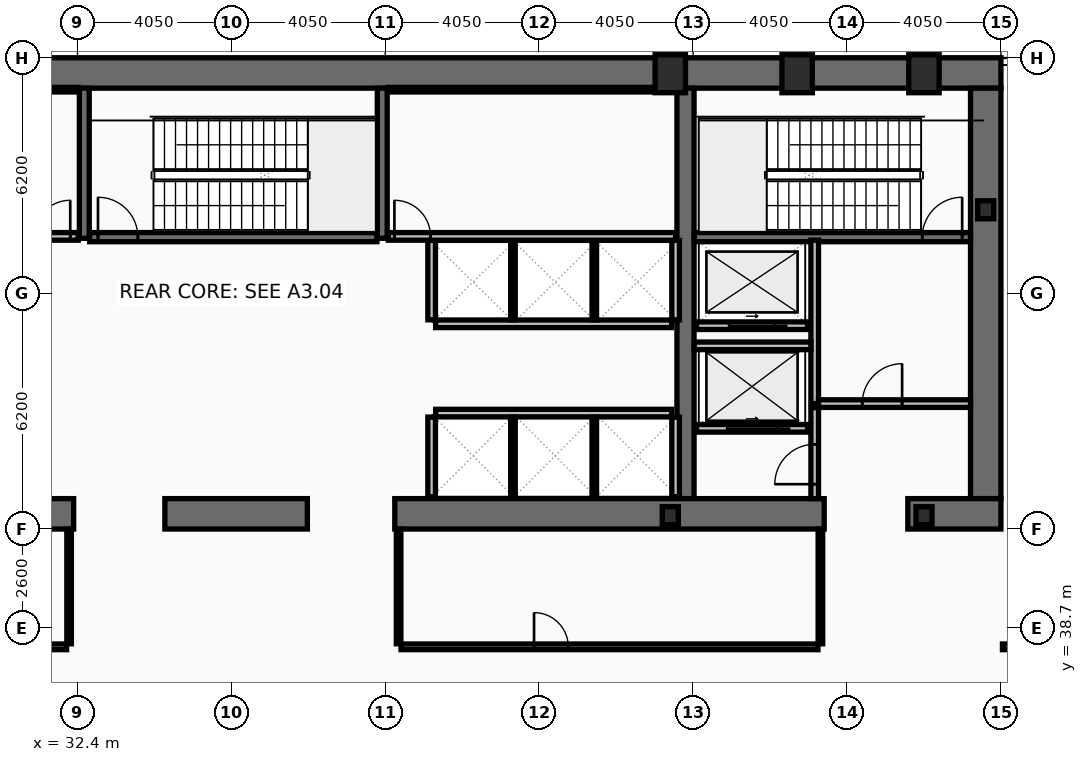
"""IFC4 building model, lengths in metres.
Left out: names, types, materials, properties, quantities, classifications, styles, units other than length and angle.
Written with IfcOpenShell. Run it as: python <this file> out.ifc"""

import sys

from ifc_helpers import new_model, si_unit, direction, frame, frame_2d, origin, origin_2d, place, context, subcontext, project, spatial, rectangle, hollow_rectangle, i_section, extrude, element, fill, save


model = new_model("IFC4")
c1 = context("Model", 3, precision=1e-05, world=origin(), true_north=direction((0.0, 1.0)))
c2 = subcontext(c1, "Body", "Model", "MODEL_VIEW")
j1 = project(units=[si_unit("LENGTHUNIT", "METRE"), si_unit("PLANEANGLEUNIT", "RADIAN")], contexts=[c1])
p1 = place(None, origin())
s1 = spatial("IfcSite", under=j1, at=p1, CompositionType="ELEMENT")
p2 = place(p1, origin())
s2 = spatial("IfcBuilding", under=s1, at=p2, CompositionType="ELEMENT")
p3 = place(p2, frame((0.0, 0.0, 15.4)))
s3 = spatial("IfcBuildingStorey", under=s2, at=p3, CompositionType="ELEMENT", Elevation=15.4)
p4 = place(p3, frame((16.2, 53.3, 0.0), z_axis=(0.0, 0.0, 1.0), x_axis=(1.0, 0.0, 0.0)))
e1 = element("IfcWall", 1, at=p4, inside=s3, PredefinedType="SHEAR", context=c2, shape_type="SweptSolid", body=[
    extrude(rectangle(XDim=40.5, YDim=0.8, at=frame_2d((20.25, 0.0))), origin(), (0.0, 0.0, 1.0), 4.78),
])
p5 = place(p3, frame((56.3, 52.9, 0.0), z_axis=(0.0, 0.0, 1.0), x_axis=(0.0, -1.0, 0.0)))
e2 = element("IfcWall", 2, at=p5, inside=s3, PredefinedType="SHEAR", context=c2, shape_type="SweptSolid", body=[
    extrude(rectangle(XDim=10.8, YDim=0.8, at=frame_2d((5.4, 0.0))), origin(), (0.0, 0.0, 1.0), 4.78),
])
p6 = place(p3, frame((48.4, 42.1, 0.0), z_axis=(0.0, 0.0, 1.0), x_axis=(0.0, 1.0, 0.0)))
e3 = element("IfcWall", 3, at=p6, inside=s3, PredefinedType="SHEAR", context=c2, shape_type="SweptSolid", body=[
    extrude(rectangle(XDim=10.8, YDim=0.45, at=frame_2d((5.4, 0.0))), origin(), (0.0, 0.0, 1.0), 4.78),
])
p7 = place(p3, frame((32.3, 41.7, 0.0), z_axis=(0.0, 0.0, 1.0), x_axis=(-1.0, 0.0, 0.0)))
e4 = element("IfcWall", 4, at=p7, inside=s3, PredefinedType="SHEAR", context=c2, shape_type="SweptSolid", body=[
    extrude(rectangle(XDim=11.45, YDim=0.8, at=frame_2d((5.725, 0.0))), origin(), (0.0, 0.0, 1.0), 4.78),
])
p8 = place(p3, frame((38.45, 41.7, 0.0), z_axis=(0.0, 0.0, 1.0), x_axis=(-1.0, 0.0, 0.0)))
e5 = element("IfcWall", 5, at=p8, inside=s3, PredefinedType="SHEAR", context=c2, shape_type="SweptSolid", body=[
    extrude(rectangle(XDim=3.75, YDim=0.8, at=frame_2d((1.875, 0.0))), origin(), (0.0, 0.0, 1.0), 4.78),
])
p9 = place(p3, frame((52.05, 41.7, 0.0), z_axis=(0.0, 0.0, 1.0), x_axis=(-1.0, 0.0, 0.0)))
e6 = element("IfcWall", 6, at=p9, inside=s3, PredefinedType="SHEAR", context=c2, shape_type="SweptSolid", body=[
    extrude(rectangle(XDim=11.3, YDim=0.8, at=frame_2d((5.65, 0.0))), origin(), (0.0, 0.0, 1.0), 4.78),
])
p10 = place(p3, frame((56.7, 41.7, 0.0), z_axis=(0.0, 0.0, 1.0), x_axis=(-1.0, 0.0, 0.0)))
e7 = element("IfcWall", 7, at=p10, inside=s3, PredefinedType="SHEAR", context=c2, shape_type="SweptSolid", body=[
    extrude(rectangle(XDim=2.45, YDim=0.8, at=frame_2d((1.225, 0.0))), origin(), (0.0, 0.0, 1.0), 4.78),
])
for number, where, z_axis, x_axis in (
    (8, (32.58, 48.95, 0.0), (0.0, 0.0, 1.0), (0.0, 1.0, 0.0)),
    (9, (40.42, 48.95, 0.0), (0.0, 0.0, 1.0), (0.0, 1.0, 0.0)),
):
    element("IfcWall", number, at=place(p3, frame(where, z_axis=z_axis, x_axis=x_axis)), inside=s3, PredefinedType="SHEAR", context=c2, shape_type="SweptSolid", body=[
        extrude(rectangle(XDim=3.95, YDim=0.26, at=frame_2d((1.975, 0.0))), origin(), (0.0, 0.0, 1.0), 4.78),
    ])
p11 = place(p3, frame((48.63, 48.98, 0.0), z_axis=(0.0, 0.0, 1.0), x_axis=(1.0, 0.0, 0.0)))
e10 = element("IfcWall", 10, at=p11, inside=s3, PredefinedType="SHEAR", context=c2, shape_type="SweptSolid", body=[
    extrude(rectangle(XDim=7.27, YDim=0.24, at=frame_2d((3.635, 0.0))), origin(), (0.0, 0.0, 1.0), 4.78),
])
p12 = place(p11, frame((6.0, 0.0, 0.0)))
e11 = element("IfcOpeningElement", 11, at=p12, cuts=e10, PredefinedType="OPENING", context=c2, shape_type="SweptSolid", body=[
    extrude(rectangle(XDim=1.05, YDim=2.15, at=frame_2d((0.525, 1.075))), frame((0.0, 0.13, 0.0), z_axis=(0.0, -1.0, 0.0), x_axis=(1.0, 0.0, 0.0)), (0.0, 0.0, 1.0), 0.26),
])
p13 = place(p3, frame((32.72, 48.98, 0.0), z_axis=(0.0, 0.0, 1.0), x_axis=(1.0, 0.0, 0.0)))
e12 = element("IfcWall", 12, at=p13, inside=s3, PredefinedType="SHEAR", context=c2, shape_type="SweptSolid", body=[
    extrude(rectangle(XDim=7.56, YDim=0.24, at=frame_2d((3.78, 0.0))), origin(), (0.0, 0.0, 1.0), 4.78),
])
p14 = place(p13, frame((0.22, 0.0, 0.0)))
e13 = element("IfcOpeningElement", 13, at=p14, cuts=e12, PredefinedType="OPENING", context=c2, shape_type="SweptSolid", body=[
    extrude(rectangle(XDim=1.05, YDim=2.15, at=frame_2d((0.525, 1.075))), frame((0.0, 0.13, 0.0), z_axis=(0.0, -1.0, 0.0), x_axis=(1.0, 0.0, 0.0)), (0.0, 0.0, 1.0), 0.26),
])
for number, where, z_axis, x_axis in (
    (14, (48.0, 53.28, 0.0), (0.0, 0.0, 1.0), (1.0, 0.0, 0.0)),
    (15, (51.337, 53.28, 0.0), (0.0, 0.0, 1.0), (1.0, 0.0, 0.0)),
    (16, (54.675, 53.28, 0.0), (0.0, 0.0, 1.0), (1.0, 0.0, 0.0)),
):
    element("IfcColumn", number, at=place(p3, frame(where, z_axis=z_axis, x_axis=x_axis)), inside=s3, PredefinedType="COLUMN", context=c2, shape_type="SweptSolid", body=[
        extrude(hollow_rectangle(XDim=0.8, YDim=1.0, WallThickness=0.055, at=origin_2d()), origin(), (0.0, 0.0, 1.0), 5.0),
    ])
for number, where, z_axis, x_axis in (
    (17, (56.3, 49.7, 0.0), (0.0, 0.0, 1.0), (1.0, 0.0, 0.0)),
    (18, (48.0, 41.65, 0.0), (0.0, 0.0, 1.0), (1.0, 0.0, 0.0)),
    (19, (54.675, 41.65, 0.0), (0.0, 0.0, 1.0), (1.0, 0.0, 0.0)),
):
    element("IfcColumn", number, at=place(p3, frame(where, z_axis=z_axis, x_axis=x_axis)), inside=s3, PredefinedType="COLUMN", context=c2, shape_type="SweptSolid", body=[
        extrude(i_section(OverallWidth=0.424, OverallDepth=0.474, WebThickness=0.048, FlangeThickness=0.077, at=origin_2d()), origin(), (0.0, 0.0, 1.0), 5.0),
    ])
p15 = place(p3, frame((51.61, 43.95, 0.0), z_axis=(0.0, 0.0, 1.0), x_axis=(-1.0, 0.0, 0.0)))
e20 = element("IfcWall", 20, at=p15, inside=s3, PredefinedType="PARTITIONING", context=c2, shape_type="SweptSolid", body=[
    extrude(rectangle(XDim=2.92, YDim=0.2, at=frame_2d((1.46, 0.0))), origin(), (0.0, 0.0, 1.0), 4.78),
])
p16 = place(p15, frame((0.81, 0.0, 0.0)))
e21 = element("IfcOpeningElement", 21, at=p16, cuts=e20, PredefinedType="OPENING", context=c2, shape_type="SweptSolid", body=[
    extrude(rectangle(XDim=1.3, YDim=2.18, at=frame_2d((0.65, 1.09))), frame((0.0, 0.11, 0.0), z_axis=(0.0, -1.0, 0.0), x_axis=(1.0, 0.0, 0.0)), (0.0, 0.0, 1.0), 0.22),
])
p17 = place(p3, frame((51.61, 46.65, 0.0), z_axis=(0.0, 0.0, 1.0), x_axis=(-1.0, 0.0, 0.0)))
e22 = element("IfcWall", 22, at=p17, inside=s3, PredefinedType="PARTITIONING", context=c2, shape_type="SweptSolid", body=[
    extrude(rectangle(XDim=2.92, YDim=0.2, at=frame_2d((1.46, 0.0))), origin(), (0.0, 0.0, 1.0), 4.78),
])
p18 = place(p17, frame((0.86, 0.0, 0.0)))
e23 = element("IfcOpeningElement", 23, at=p18, cuts=e22, PredefinedType="OPENING", context=c2, shape_type="SweptSolid", body=[
    extrude(rectangle(XDim=1.2, YDim=2.18, at=frame_2d((0.6, 1.09))), frame((0.0, 0.11, 0.0), z_axis=(0.0, -1.0, 0.0), x_axis=(1.0, 0.0, 0.0)), (0.0, 0.0, 1.0), 0.22),
])
p19 = place(p3, frame((51.8, 44.6, 0.0), z_axis=(0.0, 0.0, 1.0), x_axis=(0.0, 1.0, 0.0)))
e24 = element("IfcWall", 24, at=p19, inside=s3, PredefinedType="PARTITIONING", context=c2, shape_type="SweptSolid", body=[
    extrude(rectangle(XDim=4.3, YDim=0.2, at=frame_2d((2.15, 0.0))), origin(), (0.0, 0.0, 1.0), 4.78),
])
p20 = place(p3, frame((51.9, 44.6, 0.0), z_axis=(0.0, 0.0, 1.0), x_axis=(1.0, 0.0, 0.0)))
e25 = element("IfcWall", 25, at=p20, inside=s3, PredefinedType="PARTITIONING", context=c2, shape_type="SweptSolid", body=[
    extrude(rectangle(XDim=4.0, YDim=0.2, at=frame_2d((2.0, 0.0))), origin(), (0.0, 0.0, 1.0), 4.78),
])
p21 = place(p20, frame((1.15, 0.0, 0.0)))
e26 = element("IfcOpeningElement", 26, at=p21, cuts=e25, PredefinedType="OPENING", context=c2, shape_type="SweptSolid", body=[
    extrude(rectangle(XDim=1.05, YDim=2.15, at=frame_2d((0.525, 1.075))), frame((0.0, 0.11, 0.0), z_axis=(0.0, -1.0, 0.0), x_axis=(1.0, 0.0, 0.0)), (0.0, 0.0, 1.0), 0.22),
])
p22 = place(p3, frame((48.63, 46.12, 0.0), z_axis=(0.0, 0.0, 1.0), x_axis=(1.0, 0.0, 0.0)))
e27 = element("IfcWall", 27, at=p22, inside=s3, PredefinedType="PARTITIONING", context=c2, shape_type="SweptSolid", body=[
    extrude(rectangle(XDim=3.07, YDim=0.2, at=frame_2d((1.535, 0.0))), origin(), (0.0, 0.0, 1.0), 4.78),
])
p23 = place(p3, frame((51.8, 42.1, 0.0), z_axis=(0.0, 0.0, 1.0), x_axis=(0.0, 1.0, 0.0)))
e28 = element("IfcWall", 28, at=p23, inside=s3, PredefinedType="PARTITIONING", context=c2, shape_type="SweptSolid", body=[
    extrude(rectangle(XDim=2.395, YDim=0.2, at=frame_2d((1.198, 0.0))), origin(), (0.0, 0.0, 1.0), 4.78),
])
p24 = place(p23, frame((0.38, 0.0, 0.0)))
e29 = element("IfcOpeningElement", 29, at=p24, cuts=e28, PredefinedType="OPENING", context=c2, shape_type="SweptSolid", body=[
    extrude(rectangle(XDim=1.05, YDim=2.15, at=frame_2d((0.525, 1.075))), frame((0.0, 0.11, 0.0), z_axis=(0.0, -1.0, 0.0), x_axis=(1.0, 0.0, 0.0)), (0.0, 0.0, 1.0), 0.22),
])
p25 = place(p3, frame((41.825, 46.7, 0.0), z_axis=(0.0, 0.0, 1.0), x_axis=(1.0, 0.0, 0.0)))
e30 = element("IfcWall", 30, at=p25, inside=s3, PredefinedType="PARTITIONING", context=c2, shape_type="SweptSolid", body=[
    extrude(rectangle(XDim=6.21, YDim=0.2, at=frame_2d((3.105, 0.0))), origin(), (0.0, 0.0, 1.0), 4.78),
])
for number, where, z_axis, x_axis in (
    (31, (41.72, 46.805, 0.0), (0.0, 0.0, 1.0), (0.0, 1.0, 0.0)),
    (32, (48.14, 46.805, 0.0), (0.0, 0.0, 1.0), (0.0, 1.0, 0.0)),
):
    element("IfcWall", number, at=place(p3, frame(where, z_axis=z_axis, x_axis=x_axis)), inside=s3, PredefinedType="PARTITIONING", context=c2, shape_type="SweptSolid", body=[
        extrude(rectangle(XDim=2.09, YDim=0.2, at=frame_2d((1.045, 0.0))), origin(), (0.0, 0.0, 1.0), 4.78),
    ])
for number, where, z_axis, x_axis in (
    (33, (43.86, 46.805, 0.0), (0.0, 0.0, 1.0), (0.0, 1.0, 0.0)),
    (34, (46.0, 46.805, 0.0), (0.0, 0.0, 1.0), (0.0, 1.0, 0.0)),
):
    element("IfcWall", number, at=place(p3, frame(where, z_axis=z_axis, x_axis=x_axis)), inside=s3, PredefinedType="PARTITIONING", context=c2, shape_type="SweptSolid", body=[
        extrude(rectangle(XDim=2.09, YDim=0.12, at=frame_2d((1.045, 0.0))), origin(), (0.0, 0.0, 1.0), 4.78),
    ])
p26 = place(p3, frame((41.825, 44.35, 0.0), z_axis=(0.0, 0.0, 1.0), x_axis=(1.0, 0.0, 0.0)))
e35 = element("IfcWall", 35, at=p26, inside=s3, PredefinedType="PARTITIONING", context=c2, shape_type="SweptSolid", body=[
    extrude(rectangle(XDim=6.21, YDim=0.2, at=frame_2d((3.105, 0.0))), origin(), (0.0, 0.0, 1.0), 4.78),
])
for number, where, z_axis, x_axis in (
    (36, (41.72, 42.15, 0.0), (0.0, 0.0, 1.0), (0.0, 1.0, 0.0)),
    (37, (48.14, 42.15, 0.0), (0.0, 0.0, 1.0), (0.0, 1.0, 0.0)),
):
    element("IfcWall", number, at=place(p3, frame(where, z_axis=z_axis, x_axis=x_axis)), inside=s3, PredefinedType="PARTITIONING", context=c2, shape_type="SweptSolid", body=[
        extrude(rectangle(XDim=2.095, YDim=0.2, at=frame_2d((1.048, 0.0))), origin(), (0.0, 0.0, 1.0), 4.78),
    ])
for number, where, z_axis, x_axis in (
    (38, (43.86, 42.15, 0.0), (0.0, 0.0, 1.0), (0.0, 1.0, 0.0)),
    (39, (46.0, 42.15, 0.0), (0.0, 0.0, 1.0), (0.0, 1.0, 0.0)),
):
    element("IfcWall", number, at=place(p3, frame(where, z_axis=z_axis, x_axis=x_axis)), inside=s3, PredefinedType="PARTITIONING", context=c2, shape_type="SweptSolid", body=[
        extrude(rectangle(XDim=2.095, YDim=0.12, at=frame_2d((1.048, 0.0))), origin(), (0.0, 0.0, 1.0), 4.78),
    ])
p27 = place(p3, frame((24.7, 52.86, 0.0), z_axis=(0.0, 0.0, 1.0), x_axis=(1.0, 0.0, 0.0)))
e40 = element("IfcWall", 40, at=p27, inside=s3, PredefinedType="PARTITIONING", context=c2, shape_type="SweptSolid", body=[
    extrude(rectangle(XDim=7.72, YDim=0.12, at=frame_2d((3.86, 0.0))), origin(), (0.0, 0.0, 1.0), 4.78),
])
p28 = place(p3, frame((24.7, 49.0, 0.0), z_axis=(0.0, 0.0, 1.0), x_axis=(1.0, 0.0, 0.0)))
e41 = element("IfcWall", 41, at=p28, inside=s3, PredefinedType="PARTITIONING", context=c2, shape_type="SweptSolid", body=[
    extrude(rectangle(XDim=7.72, YDim=0.2, at=frame_2d((3.86, 0.0))), origin(), (0.0, 0.0, 1.0), 4.78),
])
p29 = place(p28, frame((6.56, 0.0, 0.0)))
e42 = element("IfcOpeningElement", 42, at=p29, cuts=e41, PredefinedType="OPENING", context=c2, shape_type="SweptSolid", body=[
    extrude(rectangle(XDim=0.95, YDim=2.1, at=frame_2d((0.475, 1.05))), frame((0.0, 0.11, 0.0), z_axis=(0.0, -1.0, 0.0), x_axis=(1.0, 0.0, 0.0)), (0.0, 0.0, 1.0), 0.22),
])
p30 = place(p3, frame((40.58, 52.86, 0.0), z_axis=(0.0, 0.0, 1.0), x_axis=(1.0, 0.0, 0.0)))
e43 = element("IfcWall", 43, at=p30, inside=s3, PredefinedType="PARTITIONING", context=c2, shape_type="SweptSolid", body=[
    extrude(rectangle(XDim=7.56, YDim=0.12, at=frame_2d((3.78, 0.0))), origin(), (0.0, 0.0, 1.0), 4.78),
])
p31 = place(p3, frame((40.58, 49.0, 0.0), z_axis=(0.0, 0.0, 1.0), x_axis=(1.0, 0.0, 0.0)))
e44 = element("IfcWall", 44, at=p31, inside=s3, PredefinedType="PARTITIONING", context=c2, shape_type="SweptSolid", body=[
    extrude(rectangle(XDim=7.56, YDim=0.2, at=frame_2d((3.78, 0.0))), origin(), (0.0, 0.0, 1.0), 4.78),
])
p32 = place(p31, frame((0.16, 0.0, 0.0)))
e45 = element("IfcOpeningElement", 45, at=p32, cuts=e44, PredefinedType="OPENING", context=c2, shape_type="SweptSolid", body=[
    extrude(rectangle(XDim=0.95, YDim=2.1, at=frame_2d((0.475, 1.05))), frame((0.0, 0.11, 0.0), z_axis=(0.0, -1.0, 0.0), x_axis=(1.0, 0.0, 0.0)), (0.0, 0.0, 1.0), 0.22),
])
p33 = place(p3, frame((29.065, 38.2, 0.0), z_axis=(0.0, 0.0, 1.0), x_axis=(1.0, 0.0, 0.0)))
e46 = element("IfcWall", 46, at=p33, inside=s3, PredefinedType="PARTITIONING", context=c2, shape_type="SweptSolid", body=[
    extrude(rectangle(XDim=3.05, YDim=0.15, at=frame_2d((1.525, 0.0))), origin(), (0.0, 0.0, 1.0), 3.87),
])
p34 = place(p33, frame((1.0, 0.0, 0.0)))
e47 = element("IfcOpeningElement", 47, at=p34, cuts=e46, PredefinedType="OPENING", context=c2, shape_type="SweptSolid", body=[
    extrude(rectangle(XDim=0.95, YDim=2.05, at=frame_2d((0.475, 1.025))), frame((0.0, 0.085, 0.0), z_axis=(0.0, -1.0, 0.0), x_axis=(1.0, 0.0, 0.0)), (0.0, 0.0, 1.0), 0.17),
])
p35 = place(p3, frame((32.18, 38.28, 0.0), z_axis=(0.0, 0.0, 1.0), x_axis=(0.0, 1.0, 0.0)))
e48 = element("IfcWall", 48, at=p35, inside=s3, PredefinedType="PARTITIONING", context=c2, shape_type="SweptSolid", body=[
    extrude(rectangle(XDim=3.02, YDim=0.12, at=frame_2d((1.51, 0.0))), origin(), (0.0, 0.0, 1.0), 4.78),
])
p36 = place(p3, frame((56.74, 38.2, 0.0), z_axis=(0.0, 0.0, 1.0), x_axis=(1.0, 0.0, 0.0)))
e49 = element("IfcWall", 49, at=p36, inside=s3, PredefinedType="PARTITIONING", context=c2, shape_type="SweptSolid", body=[
    extrude(rectangle(XDim=15.98, YDim=0.15, at=frame_2d((7.99, 0.0))), origin(), (0.0, 0.0, 1.0), 4.12),
])
p37 = place(p36, frame((4.2, 0.0, 0.0)))
e50 = element("IfcOpeningElement", 50, at=p37, cuts=e49, PredefinedType="OPENING", context=c2, shape_type="SweptSolid", body=[
    extrude(rectangle(XDim=1.0, YDim=2.05, at=frame_2d((0.5, 1.025))), frame((0.0, 0.085, 0.0), z_axis=(0.0, -1.0, 0.0), x_axis=(1.0, 0.0, 0.0)), (0.0, 0.0, 1.0), 0.17),
])
for number, where, z_axis, x_axis in (
    (51, (40.85, 38.28, 0.0), (0.0, 0.0, 1.0), (0.0, 1.0, 0.0)),
    (52, (51.95, 38.28, 0.0), (0.0, 0.0, 1.0), (0.0, 1.0, 0.0)),
):
    element("IfcWall", number, at=place(p3, frame(where, z_axis=z_axis, x_axis=x_axis)), inside=s3, PredefinedType="PARTITIONING", context=c2, shape_type="SweptSolid", body=[
        extrude(rectangle(XDim=3.02, YDim=0.12, at=frame_2d((1.51, 0.0))), origin(), (0.0, 0.0, 1.0), 4.78),
    ])
p38 = place(p3, frame((40.915, 38.2, 0.0), z_axis=(0.0, 0.0, 1.0), x_axis=(1.0, 0.0, 0.0)))
e53 = element("IfcWall", 53, at=p38, inside=s3, PredefinedType="PARTITIONING", context=c2, shape_type="SweptSolid", body=[
    extrude(rectangle(XDim=10.97, YDim=0.15, at=frame_2d((5.485, 0.0))), origin(), (0.0, 0.0, 1.0), 3.87),
])
p39 = place(p38, frame((3.5, 0.0, 0.0)))
e54 = element("IfcOpeningElement", 54, at=p39, cuts=e53, PredefinedType="OPENING", context=c2, shape_type="SweptSolid", body=[
    extrude(rectangle(XDim=0.9, YDim=2.05, at=frame_2d((0.45, 1.025))), frame((0.0, 0.085, 0.0), z_axis=(0.0, -1.0, 0.0), x_axis=(1.0, 0.0, 0.0)), (0.0, 0.0, 1.0), 0.17),
])
p40 = place(p12, origin())
e55 = element("IfcDoor", 55, at=p40, inside=s3, OperationType="SINGLE_SWING_RIGHT", PredefinedType="DOOR", context=c2, shape_type="SweptSolid", body=[
    extrude(rectangle(XDim=1.05, YDim=2.15, at=frame_2d((0.525, 1.075))), frame((0.0, 0.025, 0.0), z_axis=(0.0, -1.0, 0.0), x_axis=(1.0, 0.0, 0.0)), (0.0, 0.0, 1.0), 0.05),
])
fill(e11, e55)
p41 = place(p14, origin())
e56 = element("IfcDoor", 56, at=p41, inside=s3, OperationType="SINGLE_SWING_LEFT", PredefinedType="DOOR", context=c2, shape_type="SweptSolid", body=[
    extrude(rectangle(XDim=1.05, YDim=2.15, at=frame_2d((0.525, 1.075))), frame((0.0, 0.025, 0.0), z_axis=(0.0, -1.0, 0.0), x_axis=(1.0, 0.0, 0.0)), (0.0, 0.0, 1.0), 0.05),
])
fill(e13, e56)
p42 = place(p16, origin())
e57 = element("IfcDoor", 57, at=p42, inside=s3, OperationType="SLIDING_TO_LEFT", PredefinedType="DOOR", context=c2, shape_type="SweptSolid", body=[
    extrude(rectangle(XDim=1.3, YDim=2.18, at=frame_2d((0.65, 1.09))), frame((0.0, 0.025, 0.0), z_axis=(0.0, -1.0, 0.0), x_axis=(1.0, 0.0, 0.0)), (0.0, 0.0, 1.0), 0.05),
])
fill(e21, e57)
p43 = place(p18, origin())
e58 = element("IfcDoor", 58, at=p43, inside=s3, OperationType="SLIDING_TO_LEFT", PredefinedType="DOOR", context=c2, shape_type="SweptSolid", body=[
    extrude(rectangle(XDim=1.2, YDim=2.18, at=frame_2d((0.6, 1.09))), frame((0.0, 0.025, 0.0), z_axis=(0.0, -1.0, 0.0), x_axis=(1.0, 0.0, 0.0)), (0.0, 0.0, 1.0), 0.05),
])
fill(e23, e58)
p44 = place(p21, origin())
e59 = element("IfcDoor", 59, at=p44, inside=s3, OperationType="SINGLE_SWING_RIGHT", PredefinedType="DOOR", context=c2, shape_type="SweptSolid", body=[
    extrude(rectangle(XDim=1.05, YDim=2.15, at=frame_2d((0.525, 1.075))), frame((0.0, 0.025, 0.0), z_axis=(0.0, -1.0, 0.0), x_axis=(1.0, 0.0, 0.0)), (0.0, 0.0, 1.0), 0.05),
])
fill(e26, e59)
p45 = place(p24, origin())
e60 = element("IfcDoor", 60, at=p45, inside=s3, OperationType="SINGLE_SWING_LEFT", PredefinedType="DOOR", context=c2, shape_type="SweptSolid", body=[
    extrude(rectangle(XDim=1.05, YDim=2.15, at=frame_2d((0.525, 1.075))), frame((0.0, 0.025, 0.0), z_axis=(0.0, -1.0, 0.0), x_axis=(1.0, 0.0, 0.0)), (0.0, 0.0, 1.0), 0.05),
])
fill(e29, e60)
p46 = place(p29, origin())
e61 = element("IfcDoor", 61, at=p46, inside=s3, OperationType="SINGLE_SWING_RIGHT", PredefinedType="DOOR", context=c2, shape_type="SweptSolid", body=[
    extrude(rectangle(XDim=0.95, YDim=2.1, at=frame_2d((0.475, 1.05))), frame((0.0, 0.025, 0.0), z_axis=(0.0, -1.0, 0.0), x_axis=(1.0, 0.0, 0.0)), (0.0, 0.0, 1.0), 0.05),
])
fill(e42, e61)
p47 = place(p32, origin())
e62 = element("IfcDoor", 62, at=p47, inside=s3, OperationType="SINGLE_SWING_LEFT", PredefinedType="DOOR", context=c2, shape_type="SweptSolid", body=[
    extrude(rectangle(XDim=0.95, YDim=2.1, at=frame_2d((0.475, 1.05))), frame((0.0, 0.025, 0.0), z_axis=(0.0, -1.0, 0.0), x_axis=(1.0, 0.0, 0.0)), (0.0, 0.0, 1.0), 0.05),
])
fill(e45, e62)
p48 = place(p39, origin())
e63 = element("IfcDoor", 63, at=p48, inside=s3, OperationType="SINGLE_SWING_LEFT", PredefinedType="DOOR", context=c2, shape_type="SweptSolid", body=[
    extrude(rectangle(XDim=0.9, YDim=2.05, at=frame_2d((0.45, 1.025))), frame((0.0, 0.025, 0.0), z_axis=(0.0, -1.0, 0.0), x_axis=(1.0, 0.0, 0.0)), (0.0, 0.0, 1.0), 0.05),
])
fill(e54, e63)
save(model, sys.argv[1])
